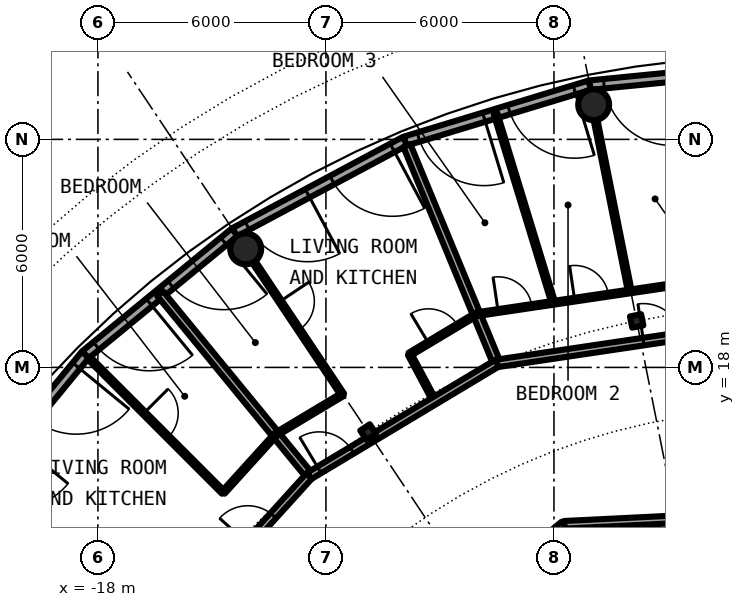
"""IFC4 building model, lengths in metres.
Left out: names, types, materials, properties, quantities, classifications, styles, units other than length and angle.
Written with IfcOpenShell. Run it as: python <this file> out.ifc"""

import sys

from ifc_helpers import new_model, si_unit, direction, frame, frame_2d, origin, origin_2d, place, context, subcontext, project, spatial, rectangle, hollow_circle, i_section, extrude, element, fill, save


model = new_model("IFC4")
c1 = context("Model", 3, precision=1e-05, world=origin(), true_north=direction((0.0, 1.0)))
c2 = subcontext(c1, "Body", "Model", "MODEL_VIEW")
j1 = project(units=[si_unit("LENGTHUNIT", "METRE"), si_unit("PLANEANGLEUNIT", "RADIAN")], contexts=[c1])
p1 = place(None, origin())
s1 = spatial("IfcSite", under=j1, at=p1, CompositionType="ELEMENT")
p2 = place(p1, origin())
s2 = spatial("IfcBuilding", under=s1, at=p2, CompositionType="ELEMENT")
p3 = place(p2, frame((0.0, 0.0, 237.1)))
s3 = spatial("IfcBuildingStorey", under=s2, at=p3, CompositionType="ELEMENT", Elevation=237.1)
for number, where, z_axis, x_axis in (
    (1, (-4.955, 24.912, 0.0), (0.0, 0.0, 1.0), (1.0, 0.0, 0.0)),
    (2, (-14.112, 21.119, 0.0), (0.0, 0.0, 1.0), (1.0, 0.0, 0.0)),
):
    element("IfcColumn", number, at=place(p3, frame(where, z_axis=z_axis, x_axis=x_axis)), inside=s3, PredefinedType="COLUMN", context=c2, shape_type="SweptSolid", body=[
        extrude(hollow_circle(Radius=0.406, WallThickness=0.03, at=origin_2d()), origin(), (0.0, 0.0, 1.0), 3.05),
    ])
for number, where, z_axis, x_axis in (
    (3, (-3.824, 19.223, 0.0), (0.0, 0.0, 1.0), (-0.195, 0.981, 0.0)),
    (4, (-10.889, 16.297, 0.0), (0.0, 0.0, 1.0), (-0.556, 0.831, 0.0)),
):
    element("IfcColumn", number, at=place(p3, frame(where, z_axis=z_axis, x_axis=x_axis)), inside=s3, PredefinedType="COLUMN", context=c2, shape_type="SweptSolid", body=[
        extrude(i_section(OverallWidth=0.3, OverallDepth=0.3, WebThickness=0.011, FlangeThickness=0.019, FilletRadius=0.027, at=origin_2d()), origin(), (0.0, 0.0, 1.0), 3.05),
    ])
p4 = place(p3, frame((0.0, 25.925, 0.0), z_axis=(0.0, 0.0, 1.0), x_axis=(-0.995187279479, -0.097991217788, 0.0)))
e5 = element("IfcWall", 5, at=p4, inside=s3, PredefinedType="SOLIDWALL", context=c2, shape_type="SweptSolid", body=[
    extrude(rectangle(XDim=5.083, YDim=0.25, at=frame_2d((2.541, 0.0))), origin(), (0.0, 0.0, 1.0), 2.7),
])
p5 = place(p4, frame((0.374, 0.0, 0.0)))
e6 = element("IfcOpeningElement", 6, at=p5, cuts=e5, PredefinedType="OPENING", context=c2, shape_type="SweptSolid", body=[
    extrude(rectangle(XDim=1.8, YDim=2.2, at=frame_2d((0.9, 1.1))), frame((0.0, 0.135, 0.0), z_axis=(0.0, -1.0, 0.0), x_axis=(1.0, 0.0, 0.0)), (0.0, 0.0, 1.0), 0.27),
])
p6 = place(p4, frame((2.909, 0.0, 0.0)))
e7 = element("IfcOpeningElement", 7, at=p6, cuts=e5, PredefinedType="OPENING", context=c2, shape_type="SweptSolid", body=[
    extrude(rectangle(XDim=1.8, YDim=2.2, at=frame_2d((0.9, 1.1))), frame((0.0, 0.135, 0.0), z_axis=(0.0, -1.0, 0.0), x_axis=(1.0, 0.0, 0.0)), (0.0, 0.0, 1.0), 0.27),
])
p7 = place(p3, frame((-5.058, 25.427, 0.0), z_axis=(0.0, 0.0, 1.0), x_axis=(-0.956941126395, -0.290282070774, 0.0)))
e8 = element("IfcWall", 8, at=p7, inside=s3, PredefinedType="SOLIDWALL", context=c2, shape_type="SweptSolid", body=[
    extrude(rectangle(XDim=5.082, YDim=0.25, at=frame_2d((2.541, 0.0))), origin(), (0.0, 0.0, 1.0), 2.7),
])
p8 = place(p7, frame((0.42, 0.0, 0.0)))
e9 = element("IfcOpeningElement", 9, at=p8, cuts=e8, PredefinedType="OPENING", context=c2, shape_type="SweptSolid", body=[
    extrude(rectangle(XDim=1.8, YDim=2.2, at=frame_2d((0.9, 1.1))), frame((0.0, 0.135, 0.0), z_axis=(0.0, -1.0, 0.0), x_axis=(1.0, 0.0, 0.0)), (0.0, 0.0, 1.0), 0.27),
])
p9 = place(p7, frame((2.909, 0.0, 0.0)))
e10 = element("IfcOpeningElement", 10, at=p9, cuts=e8, PredefinedType="OPENING", context=c2, shape_type="SweptSolid", body=[
    extrude(rectangle(XDim=1.8, YDim=2.2, at=frame_2d((0.9, 1.1))), frame((0.0, 0.135, 0.0), z_axis=(0.0, -1.0, 0.0), x_axis=(1.0, 0.0, 0.0)), (0.0, 0.0, 1.0), 0.27),
])
p10 = place(p3, frame((-9.921, 23.952, 0.0), z_axis=(0.0, 0.0, 1.0), x_axis=(-0.881903089468, -0.47143073806, 0.0)))
e11 = element("IfcWall", 11, at=p10, inside=s3, PredefinedType="SOLIDWALL", context=c2, shape_type="SweptSolid", body=[
    extrude(rectangle(XDim=5.082, YDim=0.25, at=frame_2d((2.541, 0.0))), origin(), (0.0, 0.0, 1.0), 2.7),
])
p11 = place(p10, frame((0.374, 0.0, 0.0)))
e12 = element("IfcOpeningElement", 12, at=p11, cuts=e11, PredefinedType="OPENING", context=c2, shape_type="SweptSolid", body=[
    extrude(rectangle(XDim=1.8, YDim=2.2, at=frame_2d((0.9, 1.1))), frame((0.0, 0.135, 0.0), z_axis=(0.0, -1.0, 0.0), x_axis=(1.0, 0.0, 0.0)), (0.0, 0.0, 1.0), 0.27),
])
p12 = place(p10, frame((2.909, 0.0, 0.0)))
e13 = element("IfcOpeningElement", 13, at=p12, cuts=e11, PredefinedType="OPENING", context=c2, shape_type="SweptSolid", body=[
    extrude(rectangle(XDim=1.8, YDim=2.2, at=frame_2d((0.9, 1.1))), frame((0.0, 0.135, 0.0), z_axis=(0.0, -1.0, 0.0), x_axis=(1.0, 0.0, 0.0)), (0.0, 0.0, 1.0), 0.27),
])
p13 = place(p3, frame((-14.403, 21.556, 0.0), z_axis=(0.0, 0.0, 1.0), x_axis=(-0.77306189429, -0.63433059803, 0.0)))
e14 = element("IfcWall", 14, at=p13, inside=s3, PredefinedType="SOLIDWALL", context=c2, shape_type="SweptSolid", body=[
    extrude(rectangle(XDim=5.082, YDim=0.25, at=frame_2d((2.541, 0.0))), origin(), (0.0, 0.0, 1.0), 2.7),
])
p14 = place(p13, frame((0.374, 0.0, 0.0)))
e15 = element("IfcOpeningElement", 15, at=p14, cuts=e14, PredefinedType="OPENING", context=c2, shape_type="SweptSolid", body=[
    extrude(rectangle(XDim=1.8, YDim=2.2, at=frame_2d((0.9, 1.1))), frame((0.0, 0.135, 0.0), z_axis=(0.0, -1.0, 0.0), x_axis=(1.0, 0.0, 0.0)), (0.0, 0.0, 1.0), 0.27),
])
p15 = place(p13, frame((2.909, 0.0, 0.0)))
e16 = element("IfcOpeningElement", 16, at=p15, cuts=e14, PredefinedType="OPENING", context=c2, shape_type="SweptSolid", body=[
    extrude(rectangle(XDim=1.8, YDim=2.2, at=frame_2d((0.9, 1.1))), frame((0.0, 0.135, 0.0), z_axis=(0.0, -1.0, 0.0), x_axis=(1.0, 0.0, 0.0)), (0.0, 0.0, 1.0), 0.27),
])
p16 = place(p3, frame((-18.332, 18.332, 0.0), z_axis=(0.0, 0.0, 1.0), x_axis=(-0.63433059803, -0.77306189429, 0.0)))
e17 = element("IfcWall", 17, at=p16, inside=s3, PredefinedType="SOLIDWALL", context=c2, shape_type="SweptSolid", body=[
    extrude(rectangle(XDim=5.082, YDim=0.25, at=frame_2d((2.541, 0.0))), origin(), (0.0, 0.0, 1.0), 2.7),
])
p17 = place(p16, frame((0.374, 0.0, 0.0)))
e18 = element("IfcOpeningElement", 18, at=p17, cuts=e17, PredefinedType="OPENING", context=c2, shape_type="SweptSolid", body=[
    extrude(rectangle(XDim=1.8, YDim=2.2, at=frame_2d((0.9, 1.1))), frame((0.0, 0.135, 0.0), z_axis=(0.0, -1.0, 0.0), x_axis=(1.0, 0.0, 0.0)), (0.0, 0.0, 1.0), 0.27),
])
p18 = place(p16, frame((2.909, 0.0, 0.0)))
e19 = element("IfcOpeningElement", 19, at=p18, cuts=e17, PredefinedType="OPENING", context=c2, shape_type="SweptSolid", body=[
    extrude(rectangle(XDim=1.8, YDim=2.2, at=frame_2d((0.9, 1.1))), frame((0.0, 0.135, 0.0), z_axis=(0.0, -1.0, 0.0), x_axis=(1.0, 0.0, 0.0)), (0.0, 0.0, 1.0), 0.27),
])
p19 = place(p3, frame((-9.871, 23.837, 0.0), z_axis=(0.0, 0.0, 1.0), x_axis=(0.382282230395, -0.924045613768, 0.0)))
e20 = element("IfcWall", 20, at=p19, inside=s3, PredefinedType="PARTITIONING", context=c2, shape_type="SweptSolid", body=[
    extrude(rectangle(XDim=6.2, YDim=0.2, at=frame_2d((3.1, 0.0))), origin(), (0.0, 0.0, 1.0), 2.7),
])
p20 = place(p3, frame((-5.742, 13.857, 0.0), z_axis=(0.0, 0.0, 1.0), x_axis=(0.382275765368, -0.924048288355, 0.0)))
e21 = element("IfcWall", 21, at=p20, inside=s3, PredefinedType="PARTITIONING", context=c2, shape_type="SweptSolid", body=[
    extrude(rectangle(XDim=7.28, YDim=0.2, at=frame_2d((3.64, 0.0))), origin(), (0.0, 0.0, 1.0), 2.7),
])
p21 = place(p3, frame((-20.788, 13.89, 0.0), z_axis=(0.0, 0.0, 1.0), x_axis=(0.831406006746, -0.555665413668, 0.0)))
e22 = element("IfcWall", 22, at=p21, inside=s3, PredefinedType="PARTITIONING", context=c2, shape_type="SweptSolid", body=[
    extrude(rectangle(XDim=5.251, YDim=0.2, at=frame_2d((2.625, 0.0))), origin(), (0.0, 0.0, 1.0), 2.7),
])
p22 = place(p3, frame((-18.238, 18.249, 0.0), z_axis=(0.0, 0.0, 1.0), x_axis=(0.706911528738, -0.707301979735, 0.0)))
e23 = element("IfcWall", 23, at=p22, inside=s3, PredefinedType="PARTITIONING", context=c2, shape_type="SweptSolid", body=[
    extrude(rectangle(XDim=5.002, YDim=0.1, at=frame_2d((2.501, 0.0))), origin(), (0.0, 0.0, 1.0), 2.7),
])
p23 = place(p22, frame((2.051, 0.0, 0.0)))
e24 = element("IfcOpeningElement", 24, at=p23, cuts=e23, PredefinedType="OPENING", context=c2, shape_type="SweptSolid", body=[
    extrude(rectangle(XDim=0.9, YDim=2.3, at=frame_2d((0.45, 1.15))), frame((0.0, 0.06, 0.0), z_axis=(0.0, -1.0, 0.0), x_axis=(1.0, 0.0, 0.0)), (0.0, 0.0, 1.0), 0.12),
])
p24 = place(p3, frame((-16.366, 19.945, 0.0), z_axis=(0.0, 0.0, 1.0), x_axis=(0.634332904094, -0.773060002059, 0.0)))
e25 = element("IfcWall", 25, at=p24, inside=s3, PredefinedType="PARTITIONING", context=c2, shape_type="SweptSolid", body=[
    extrude(rectangle(XDim=6.2, YDim=0.2, at=frame_2d((3.1, 0.0))), origin(), (0.0, 0.0, 1.0), 2.7),
])
p25 = place(p3, frame((-13.902, 20.78, 0.0), z_axis=(0.0, 0.0, 1.0), x_axis=(0.55597277711, -0.831200499947, 0.0)))
e26 = element("IfcWall", 26, at=p25, inside=s3, PredefinedType="PARTITIONING", context=c2, shape_type="SweptSolid", body=[
    extrude(rectangle(XDim=4.204, YDim=0.1, at=frame_2d((2.102, 0.0))), origin(), (0.0, 0.0, 1.0), 2.7),
])
p26 = place(p25, frame((1.253, 0.0, 0.0)))
e27 = element("IfcOpeningElement", 27, at=p26, cuts=e26, PredefinedType="OPENING", context=c2, shape_type="SweptSolid", body=[
    extrude(rectangle(XDim=0.9, YDim=2.3, at=frame_2d((0.45, 1.15))), frame((0.0, 0.06, 0.0), z_axis=(0.0, -1.0, 0.0), x_axis=(1.0, 0.0, 0.0)), (0.0, 0.0, 1.0), 0.12),
])
p27 = place(p3, frame((-9.798, 18.345, 0.0), z_axis=(0.0, 0.0, 1.0), x_axis=(0.471072596947, -0.882094444153, 0.0)))
e28 = element("IfcWall", 28, at=p27, inside=s3, PredefinedType="PARTITIONING", context=c2, shape_type="SweptSolid", body=[
    extrude(rectangle(XDim=1.386, YDim=0.1, at=frame_2d((0.693, 0.0))), origin(), (0.0, 0.0, 1.0), 2.7),
])
p28 = place(p3, frame((-7.537, 24.675, 0.0), z_axis=(0.0, 0.0, 1.0), x_axis=(0.292244771208, -0.956343554222, 0.0)))
e29 = element("IfcWall", 29, at=p28, inside=s3, PredefinedType="PARTITIONING", context=c2, shape_type="SweptSolid", body=[
    extrude(rectangle(XDim=5.201, YDim=0.1, at=frame_2d((2.601, 0.0))), origin(), (0.0, 0.0, 1.0), 2.7),
])
p29 = place(p3, frame((-4.907, 24.515, 0.0), z_axis=(0.0, 0.0, 1.0), x_axis=(0.196299631225, -0.980543958617, 0.0)))
e30 = element("IfcWall", 30, at=p29, inside=s3, PredefinedType="PARTITIONING", context=c2, shape_type="SweptSolid", body=[
    extrude(rectangle(XDim=4.605, YDim=0.1, at=frame_2d((2.303, 0.0))), origin(), (0.0, 0.0, 1.0), 2.7),
])
p30 = place(p3, frame((-4.298, 13.929, 0.0), z_axis=(0.0, 0.0, 1.0), x_axis=(0.294733203916, -0.95557958251, 0.0)))
e31 = element("IfcWall", 31, at=p30, inside=s3, PredefinedType="PARTITIONING", context=c2, shape_type="SweptSolid", body=[
    extrude(rectangle(XDim=2.623, YDim=0.1, at=frame_2d((1.312, 0.0))), origin(), (0.0, 0.0, 1.0), 2.7),
])
p31 = place(p30, frame((0.862, 0.0, 0.0)))
e32 = element("IfcOpeningElement", 32, at=p31, cuts=e31, PredefinedType="OPENING", context=c2, shape_type="SweptSolid", body=[
    extrude(rectangle(XDim=0.9, YDim=2.3, at=frame_2d((0.45, 1.15))), frame((0.0, 0.06, 0.0), z_axis=(0.0, -1.0, 0.0), x_axis=(1.0, 0.0, 0.0)), (0.0, 0.0, 1.0), 0.12),
])
p32 = place(p3, frame((-5.74, 13.858, 0.0), z_axis=(0.0, 0.0, 1.0), x_axis=(0.998789706874, 0.049184565079, 0.0)))
e33 = element("IfcWall", 33, at=p32, inside=s3, PredefinedType="PARTITIONING", context=c2, shape_type="SweptSolid", body=[
    extrude(rectangle(XDim=10.106, YDim=0.2, at=frame_2d((5.053, 0.0))), origin(), (0.0, 0.0, 1.0), 2.7),
])
p33 = place(p32, frame((5.274, 0.0, 0.0)))
e34 = element("IfcOpeningElement", 34, at=p33, cuts=e33, PredefinedType="OPENING", context=c2, shape_type="SweptSolid", body=[
    extrude(rectangle(XDim=1.0, YDim=2.3, at=frame_2d((0.5, 1.15))), frame((0.0, 0.11, 0.0), z_axis=(0.0, -1.0, 0.0), x_axis=(1.0, 0.0, 0.0)), (0.0, 0.0, 1.0), 0.22),
])
p34 = place(p3, frame((-10.228, 10.175, 0.0), z_axis=(0.0, 0.0, 1.0), x_axis=(0.772989261861, 0.634419105204, 0.0)))
e35 = element("IfcWall", 35, at=p34, inside=s3, PredefinedType="PARTITIONING", context=c2, shape_type="SweptSolid", body=[
    extrude(rectangle(XDim=5.803, YDim=0.2, at=frame_2d((2.902, 0.0))), origin(), (0.0, 0.0, 1.0), 2.7),
])
p35 = place(p34, frame((0.952, 0.0, 0.0)))
e36 = element("IfcOpeningElement", 36, at=p35, cuts=e35, PredefinedType="OPENING", context=c2, shape_type="SweptSolid", body=[
    extrude(rectangle(XDim=1.0, YDim=2.3, at=frame_2d((0.5, 1.15))), frame((0.0, 0.11, 0.0), z_axis=(0.0, -1.0, 0.0), x_axis=(1.0, 0.0, 0.0)), (0.0, 0.0, 1.0), 0.22),
])
p36 = place(p3, frame((-7.506, 18.105, 0.0), z_axis=(0.0, 0.0, 1.0), x_axis=(0.989134446023, 0.147013767014, 0.0)))
e37 = element("IfcWall", 37, at=p36, inside=s3, PredefinedType="PARTITIONING", context=c2, shape_type="SweptSolid", body=[
    extrude(rectangle(XDim=9.531, YDim=0.2, at=frame_2d((4.765, 0.0))), origin(), (0.0, 0.0, 1.0), 2.45),
])
p37 = place(p36, frame((3.905, 0.0, 0.0)))
e38 = element("IfcOpeningElement", 38, at=p37, cuts=e37, PredefinedType="OPENING", context=c2, shape_type="SweptSolid", body=[
    extrude(rectangle(XDim=1.0, YDim=2.3, at=frame_2d((0.5, 1.15))), frame((0.0, 0.11, 0.0), z_axis=(0.0, -1.0, 0.0), x_axis=(1.0, 0.0, 0.0)), (0.0, 0.0, 1.0), 0.22),
])
p38 = place(p3, frame((-16.195, 11.002, 0.0), z_axis=(0.0, 0.0, 1.0), x_axis=(0.671619657805, 0.740896102871, 0.0)))
e39 = element("IfcWall", 39, at=p38, inside=s3, PredefinedType="PARTITIONING", context=c2, shape_type="SweptSolid", body=[
    extrude(rectangle(XDim=5.6, YDim=0.2, at=frame_2d((2.8, 0.0))), origin(), (0.0, 0.0, 1.0), 2.45),
])
p39 = place(p38, frame((3.183, 0.0, 0.0)))
e40 = element("IfcOpeningElement", 40, at=p39, cuts=e39, PredefinedType="OPENING", context=c2, shape_type="SweptSolid", body=[
    extrude(rectangle(XDim=1.0, YDim=2.3, at=frame_2d((0.5, 1.15))), frame((0.0, 0.11, 0.0), z_axis=(0.0, -1.0, 0.0), x_axis=(1.0, 0.0, 0.0)), (0.0, 0.0, 1.0), 0.22),
])
p40 = place(p3, frame((-12.439, 15.146, 0.0), z_axis=(0.0, 0.0, 1.0), x_axis=(0.857560257806, 0.514383518624, 0.0)))
e41 = element("IfcWall", 41, at=p40, inside=s3, PredefinedType="PARTITIONING", context=c2, shape_type="SweptSolid", body=[
    extrude(rectangle(XDim=5.758, YDim=0.2, at=frame_2d((2.879, 0.0))), origin(), (0.0, 0.0, 1.0), 2.45),
])
p41 = place(p40, frame((0.307, 0.0, 0.0)))
e42 = element("IfcOpeningElement", 42, at=p41, cuts=e41, PredefinedType="OPENING", context=c2, shape_type="SweptSolid", body=[
    extrude(rectangle(XDim=1.0, YDim=2.3, at=frame_2d((0.5, 1.15))), frame((0.0, 0.11, 0.0), z_axis=(0.0, -1.0, 0.0), x_axis=(1.0, 0.0, 0.0)), (0.0, 0.0, 1.0), 0.22),
])
p42 = place(p3, frame((-8.039, 19.399, 0.0), z_axis=(0.0, 0.0, 1.0), x_axis=(0.989150987706, 0.14690242857, 0.0)))
e43 = element("IfcWall", 43, at=p42, inside=s3, PredefinedType="PARTITIONING", context=c2, shape_type="SweptSolid", body=[
    extrude(rectangle(XDim=6.127, YDim=0.1, at=frame_2d((3.064, 0.0))), origin(), (0.0, 0.0, 1.0), 2.7),
])
p43 = place(p42, frame((2.611, 0.0, 0.0)))
e44 = element("IfcOpeningElement", 44, at=p43, cuts=e43, PredefinedType="OPENING", context=c2, shape_type="SweptSolid", body=[
    extrude(rectangle(XDim=0.9, YDim=2.3, at=frame_2d((0.45, 1.15))), frame((0.0, 0.06, 0.0), z_axis=(0.0, -1.0, 0.0), x_axis=(1.0, 0.0, 0.0)), (0.0, 0.0, 1.0), 0.12),
])
p44 = place(p42, frame((0.575, 0.0, 0.0)))
e45 = element("IfcOpeningElement", 45, at=p44, cuts=e43, PredefinedType="OPENING", context=c2, shape_type="SweptSolid", body=[
    extrude(rectangle(XDim=0.9, YDim=2.3, at=frame_2d((0.45, 1.15))), frame((0.0, 0.06, 0.0), z_axis=(0.0, -1.0, 0.0), x_axis=(1.0, 0.0, 0.0)), (0.0, 0.0, 1.0), 0.12),
])
p45 = place(p3, frame((-14.701, 14.711, 0.0), z_axis=(0.0, 0.0, 1.0), x_axis=(0.671678456097, 0.74084279818, 0.0)))
e46 = element("IfcWall", 46, at=p45, inside=s3, PredefinedType="PARTITIONING", context=c2, shape_type="SweptSolid", body=[
    extrude(rectangle(XDim=2.054, YDim=0.1, at=frame_2d((1.027, 0.0))), origin(), (0.0, 0.0, 1.0), 2.7),
])
p46 = place(p3, frame((-13.322, 16.233, 0.0), z_axis=(0.0, 0.0, 1.0), x_axis=(0.857713062192, 0.514128683254, 0.0)))
e47 = element("IfcWall", 47, at=p46, inside=s3, PredefinedType="PARTITIONING", context=c2, shape_type="SweptSolid", body=[
    extrude(rectangle(XDim=2.054, YDim=0.1, at=frame_2d((1.027, 0.0))), origin(), (0.0, 0.0, 1.0), 2.7),
])
p47 = place(p3, frame((-9.802, 18.342, 0.0), z_axis=(0.0, 0.0, 1.0), x_axis=(0.857670716077, 0.514199322038, 0.0)))
e48 = element("IfcWall", 48, at=p47, inside=s3, PredefinedType="PARTITIONING", context=c2, shape_type="SweptSolid", body=[
    extrude(rectangle(XDim=2.059, YDim=0.1, at=frame_2d((1.03, 0.0))), origin(), (0.0, 0.0, 1.0), 2.7),
])
p48 = place(p47, frame((0.582, 0.0, 0.0)))
e49 = element("IfcOpeningElement", 49, at=p48, cuts=e48, PredefinedType="OPENING", context=c2, shape_type="SweptSolid", body=[
    extrude(rectangle(XDim=0.9, YDim=2.3, at=frame_2d((0.45, 1.15))), frame((0.0, 0.06, 0.0), z_axis=(0.0, -1.0, 0.0), x_axis=(1.0, 0.0, 0.0)), (0.0, 0.0, 1.0), 0.12),
])
p49 = place(p6, origin())
e50 = element("IfcDoor", 50, at=p49, inside=s3, OperationType="SINGLE_SWING_LEFT", PredefinedType="DOOR", context=c2, shape_type="SweptSolid", body=[
    extrude(rectangle(XDim=1.8, YDim=2.2, at=frame_2d((0.9, 1.1))), frame((0.0, 0.025, 0.0), z_axis=(0.0, -1.0, 0.0), x_axis=(1.0, 0.0, 0.0)), (0.0, 0.0, 1.0), 0.05),
])
fill(e7, e50)
p50 = place(p8, origin())
e51 = element("IfcDoor", 51, at=p50, inside=s3, OperationType="SINGLE_SWING_LEFT", PredefinedType="DOOR", context=c2, shape_type="SweptSolid", body=[
    extrude(rectangle(XDim=1.8, YDim=2.2, at=frame_2d((0.9, 1.1))), frame((0.0, 0.025, 0.0), z_axis=(0.0, -1.0, 0.0), x_axis=(1.0, 0.0, 0.0)), (0.0, 0.0, 1.0), 0.05),
])
fill(e9, e51)
p51 = place(p9, origin())
e52 = element("IfcDoor", 52, at=p51, inside=s3, OperationType="SINGLE_SWING_LEFT", PredefinedType="DOOR", context=c2, shape_type="SweptSolid", body=[
    extrude(rectangle(XDim=1.8, YDim=2.2, at=frame_2d((0.9, 1.1))), frame((0.0, 0.025, 0.0), z_axis=(0.0, -1.0, 0.0), x_axis=(1.0, 0.0, 0.0)), (0.0, 0.0, 1.0), 0.05),
])
fill(e10, e52)
p52 = place(p11, origin())
e53 = element("IfcDoor", 53, at=p52, inside=s3, OperationType="SINGLE_SWING_LEFT", PredefinedType="DOOR", context=c2, shape_type="SweptSolid", body=[
    extrude(rectangle(XDim=1.8, YDim=2.2, at=frame_2d((0.9, 1.1))), frame((0.0, 0.025, 0.0), z_axis=(0.0, -1.0, 0.0), x_axis=(1.0, 0.0, 0.0)), (0.0, 0.0, 1.0), 0.05),
])
fill(e12, e53)
p53 = place(p12, origin())
e54 = element("IfcDoor", 54, at=p53, inside=s3, OperationType="SINGLE_SWING_LEFT", PredefinedType="DOOR", context=c2, shape_type="SweptSolid", body=[
    extrude(rectangle(XDim=1.8, YDim=2.2, at=frame_2d((0.9, 1.1))), frame((0.0, 0.025, 0.0), z_axis=(0.0, -1.0, 0.0), x_axis=(1.0, 0.0, 0.0)), (0.0, 0.0, 1.0), 0.05),
])
fill(e13, e54)
p54 = place(p14, origin())
e55 = element("IfcDoor", 55, at=p54, inside=s3, OperationType="SINGLE_SWING_LEFT", PredefinedType="DOOR", context=c2, shape_type="SweptSolid", body=[
    extrude(rectangle(XDim=1.8, YDim=2.2, at=frame_2d((0.9, 1.1))), frame((0.0, 0.025, 0.0), z_axis=(0.0, -1.0, 0.0), x_axis=(1.0, 0.0, 0.0)), (0.0, 0.0, 1.0), 0.05),
])
fill(e15, e55)
p55 = place(p15, origin())
e56 = element("IfcDoor", 56, at=p55, inside=s3, OperationType="SINGLE_SWING_LEFT", PredefinedType="DOOR", context=c2, shape_type="SweptSolid", body=[
    extrude(rectangle(XDim=1.8, YDim=2.2, at=frame_2d((0.9, 1.1))), frame((0.0, 0.025, 0.0), z_axis=(0.0, -1.0, 0.0), x_axis=(1.0, 0.0, 0.0)), (0.0, 0.0, 1.0), 0.05),
])
fill(e16, e56)
p56 = place(p17, origin())
e57 = element("IfcDoor", 57, at=p56, inside=s3, OperationType="SINGLE_SWING_LEFT", PredefinedType="DOOR", context=c2, shape_type="SweptSolid", body=[
    extrude(rectangle(XDim=1.8, YDim=2.2, at=frame_2d((0.9, 1.1))), frame((0.0, 0.025, 0.0), z_axis=(0.0, -1.0, 0.0), x_axis=(1.0, 0.0, 0.0)), (0.0, 0.0, 1.0), 0.05),
])
fill(e18, e57)
p57 = place(p37, origin())
e58 = element("IfcDoor", 58, at=p57, inside=s3, OperationType="SINGLE_SWING_LEFT", PredefinedType="DOOR", context=c2, shape_type="SweptSolid", body=[
    extrude(rectangle(XDim=1.0, YDim=2.3, at=frame_2d((0.5, 1.15))), frame((0.0, 0.025, 0.0), z_axis=(0.0, -1.0, 0.0), x_axis=(1.0, 0.0, 0.0)), (0.0, 0.0, 1.0), 0.05),
])
fill(e38, e58)
p58 = place(p43, origin())
e59 = element("IfcDoor", 59, at=p58, inside=s3, OperationType="SINGLE_SWING_LEFT", PredefinedType="DOOR", context=c2, shape_type="SweptSolid", body=[
    extrude(rectangle(XDim=0.9, YDim=2.3, at=frame_2d((0.45, 1.15))), frame((0.0, 0.025, 0.0), z_axis=(0.0, -1.0, 0.0), x_axis=(1.0, 0.0, 0.0)), (0.0, 0.0, 1.0), 0.05),
])
fill(e44, e59)
p59 = place(p44, origin())
e60 = element("IfcDoor", 60, at=p59, inside=s3, OperationType="SINGLE_SWING_LEFT", PredefinedType="DOOR", context=c2, shape_type="SweptSolid", body=[
    extrude(rectangle(XDim=0.9, YDim=2.3, at=frame_2d((0.45, 1.15))), frame((0.0, 0.025, 0.0), z_axis=(0.0, -1.0, 0.0), x_axis=(1.0, 0.0, 0.0)), (0.0, 0.0, 1.0), 0.05),
])
fill(e45, e60)
p60 = place(p41, origin())
e61 = element("IfcDoor", 61, at=p60, inside=s3, OperationType="SINGLE_SWING_LEFT", PredefinedType="DOOR", context=c2, shape_type="SweptSolid", body=[
    extrude(rectangle(XDim=1.0, YDim=2.3, at=frame_2d((0.5, 1.15))), frame((0.0, 0.025, 0.0), z_axis=(0.0, -1.0, 0.0), x_axis=(1.0, 0.0, 0.0)), (0.0, 0.0, 1.0), 0.05),
])
fill(e42, e61)
p61 = place(p48, origin())
e62 = element("IfcDoor", 62, at=p61, inside=s3, OperationType="SINGLE_SWING_RIGHT", PredefinedType="DOOR", context=c2, shape_type="SweptSolid", body=[
    extrude(rectangle(XDim=0.9, YDim=2.3, at=frame_2d((0.45, 1.15))), frame((0.0, 0.025, 0.0), z_axis=(0.0, -1.0, 0.0), x_axis=(1.0, 0.0, 0.0)), (0.0, 0.0, 1.0), 0.05),
])
fill(e49, e62)
p62 = place(p26, origin())
e63 = element("IfcDoor", 63, at=p62, inside=s3, OperationType="SINGLE_SWING_LEFT", PredefinedType="DOOR", context=c2, shape_type="SweptSolid", body=[
    extrude(rectangle(XDim=0.9, YDim=2.3, at=frame_2d((0.45, 1.15))), frame((0.0, 0.025, 0.0), z_axis=(0.0, -1.0, 0.0), x_axis=(1.0, 0.0, 0.0)), (0.0, 0.0, 1.0), 0.05),
])
fill(e27, e63)
p63 = place(p39, origin())
e64 = element("IfcDoor", 64, at=p63, inside=s3, OperationType="SINGLE_SWING_RIGHT", PredefinedType="DOOR", context=c2, shape_type="SweptSolid", body=[
    extrude(rectangle(XDim=1.0, YDim=2.3, at=frame_2d((0.5, 1.15))), frame((0.0, 0.025, 0.0), z_axis=(0.0, -1.0, 0.0), x_axis=(1.0, 0.0, 0.0)), (0.0, 0.0, 1.0), 0.05),
])
fill(e40, e64)
p64 = place(p23, origin())
e65 = element("IfcDoor", 65, at=p64, inside=s3, OperationType="SINGLE_SWING_RIGHT", PredefinedType="DOOR", context=c2, shape_type="SweptSolid", body=[
    extrude(rectangle(XDim=0.9, YDim=2.3, at=frame_2d((0.45, 1.15))), frame((0.0, 0.025, 0.0), z_axis=(0.0, -1.0, 0.0), x_axis=(1.0, 0.0, 0.0)), (0.0, 0.0, 1.0), 0.05),
])
fill(e24, e65)
save(model, sys.argv[1])
